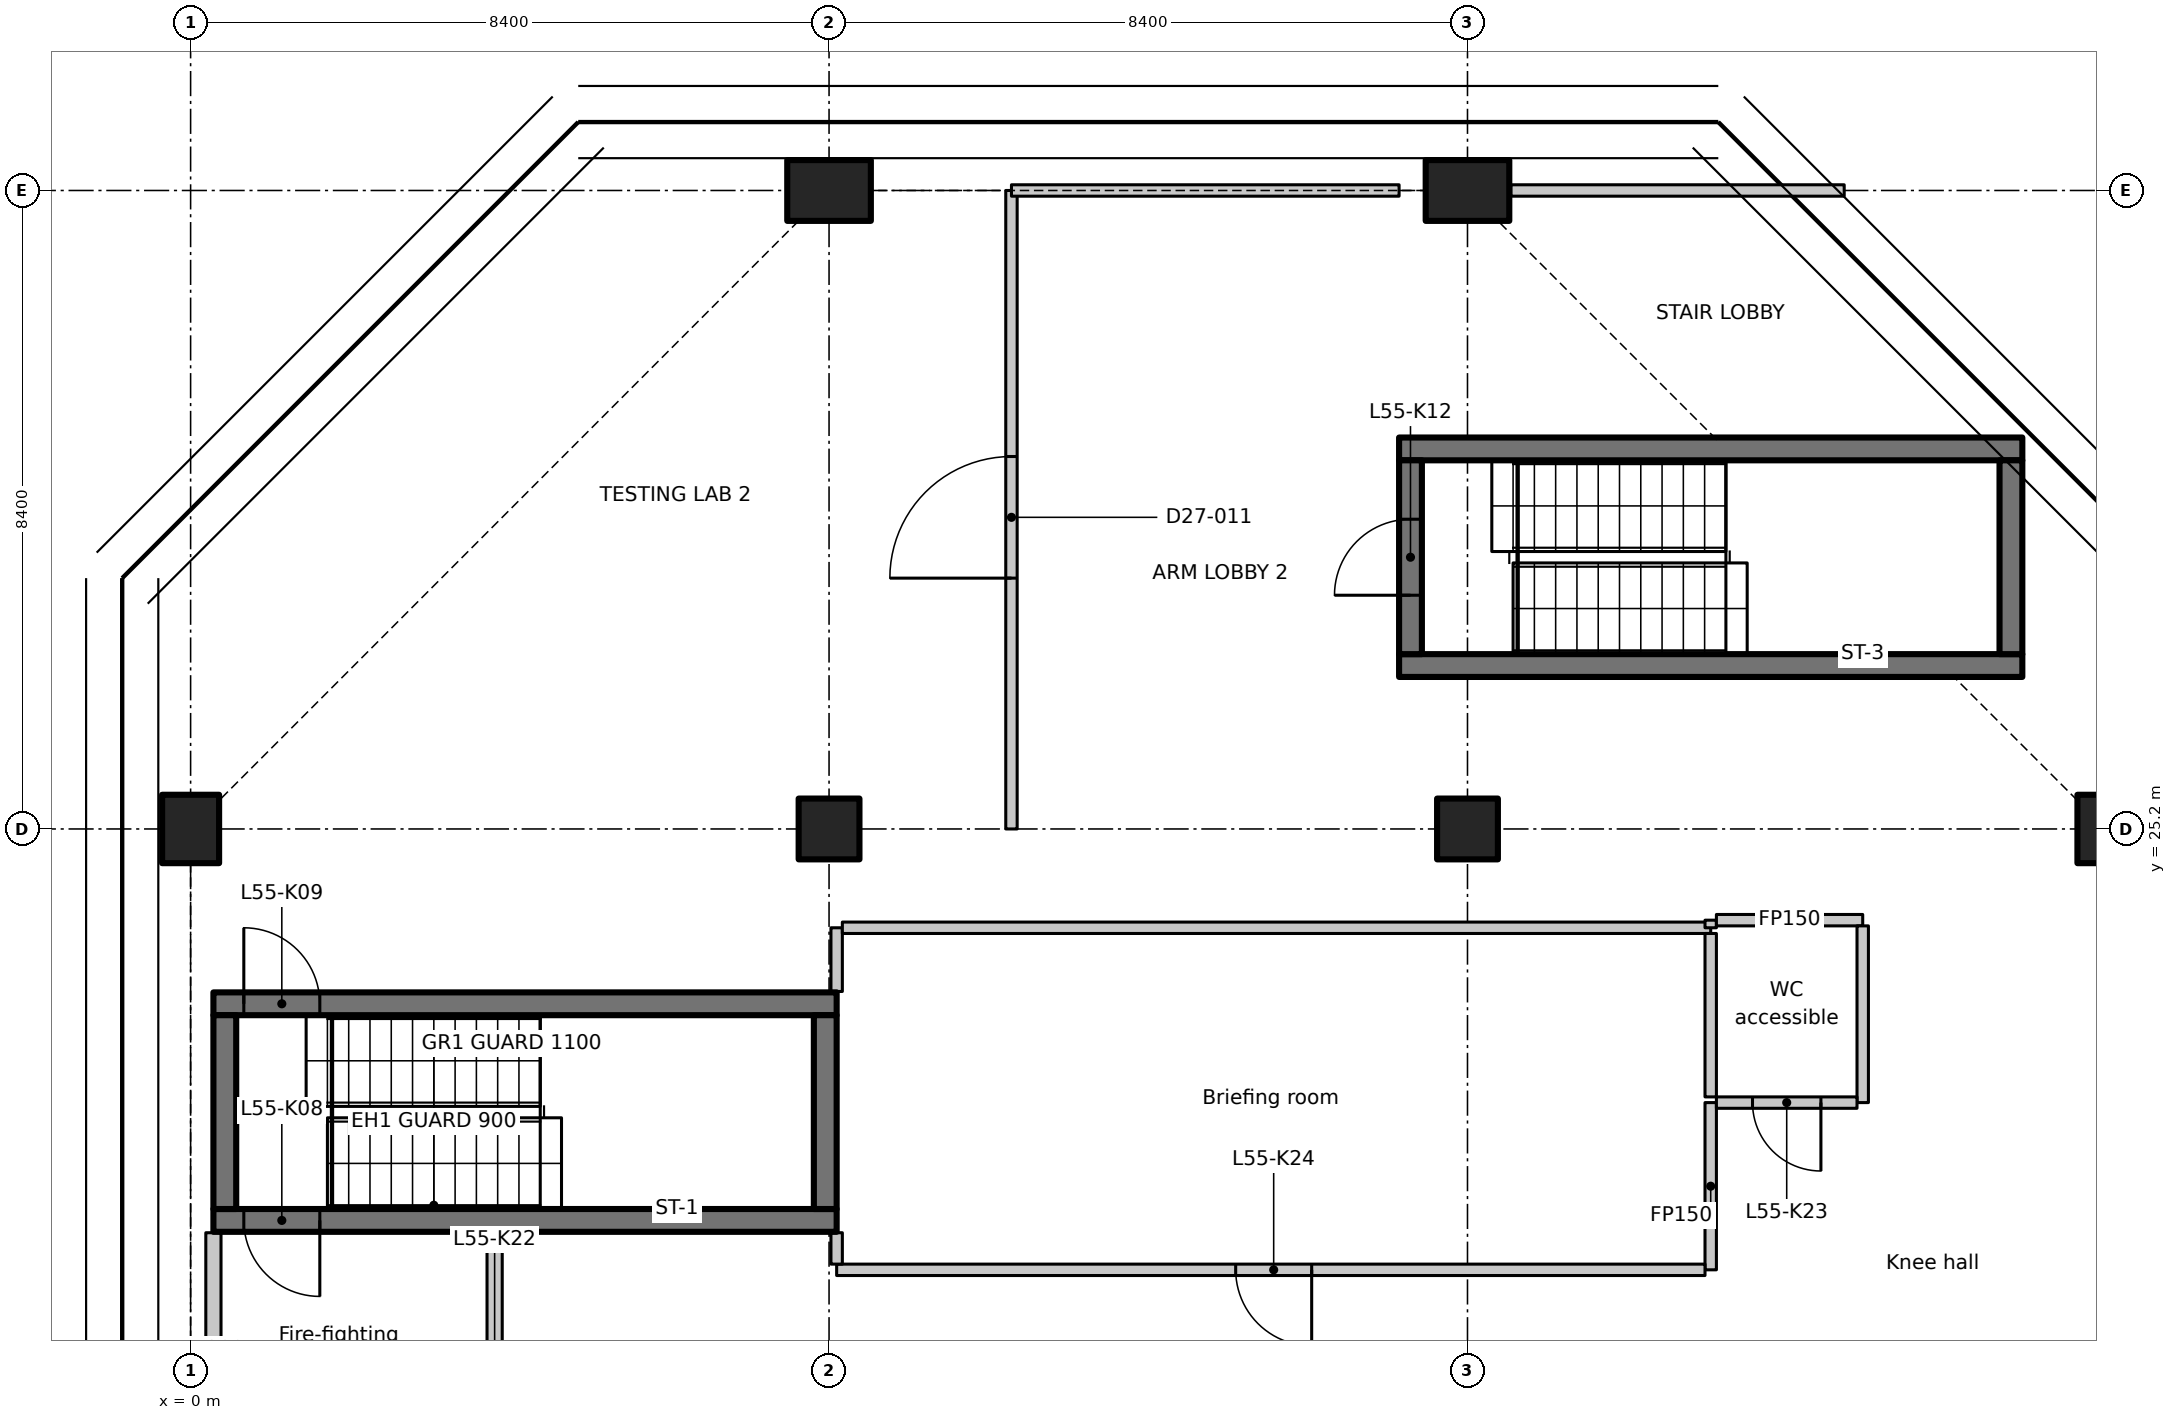
"""IFC4 building model, lengths in metres.
Left out: names, types, materials, properties, quantities, classifications, styles, units other than length and angle.
Written with IfcOpenShell. Run it as: python <this file> out.ifc"""

import sys

from ifc_helpers import new_model, si_unit, direction, frame, frame_2d, origin, origin_2d, place, context, subcontext, project, spatial, polyline, rectangle, outline, extrude, element, fill, save


model = new_model("IFC4")
c1 = context("Model", 3, precision=1e-05, world=origin(), true_north=direction((0.0, 1.0)))
c2 = subcontext(c1, "Body", "Model", "MODEL_VIEW")
j1 = project(units=[si_unit("LENGTHUNIT", "METRE"), si_unit("PLANEANGLEUNIT", "RADIAN")], contexts=[c1])
p1 = place(None, origin())
s1 = spatial("IfcSite", under=j1, at=p1, CompositionType="ELEMENT")
p2 = place(p1, origin())
s2 = spatial("IfcBuilding", under=s1, at=p2, CompositionType="ELEMENT")
p3 = place(p2, frame((0.0, 0.0, 219.3)))
s3 = spatial("IfcBuildingStorey", under=s2, at=p3, CompositionType="ELEMENT", Elevation=219.3)
p4 = place(p3, frame((0.0, 25.2, 0.0), z_axis=(0.0, 0.0, 1.0), x_axis=(1.0, 0.0, 0.0)))
e1 = element("IfcColumn", 1, at=p4, inside=s3, PredefinedType="COLUMN", context=c2, shape_type="SweptSolid", body=[
    extrude(rectangle(XDim=0.75, YDim=0.9, at=origin_2d()), origin(), (0.0, 0.0, 1.0), 3.35),
])
p5 = place(p3, frame((8.4, 25.2, 0.0), z_axis=(0.0, 0.0, 1.0), x_axis=(1.0, 0.0, 0.0)))
e2 = element("IfcColumn", 2, at=p5, inside=s3, PredefinedType="COLUMN", context=c2, shape_type="SweptSolid", body=[
    extrude(rectangle(XDim=0.8, YDim=0.8, at=origin_2d()), origin(), (0.0, 0.0, 1.0), 3.35),
])
p6 = place(p3, frame((8.4, 33.6, 0.0), z_axis=(0.0, 0.0, 1.0), x_axis=(0.0, 1.0, 0.0)))
e3 = element("IfcColumn", 3, at=p6, inside=s3, PredefinedType="COLUMN", context=c2, shape_type="SweptSolid", body=[
    extrude(rectangle(XDim=0.8, YDim=1.1, at=origin_2d()), origin(), (0.0, 0.0, 1.0), 3.35),
])
p7 = place(p3, frame((16.8, 25.2, 0.0), z_axis=(0.0, 0.0, 1.0), x_axis=(1.0, 0.0, 0.0)))
e4 = element("IfcColumn", 4, at=p7, inside=s3, PredefinedType="COLUMN", context=c2, shape_type="SweptSolid", body=[
    extrude(rectangle(XDim=0.8, YDim=0.8, at=origin_2d()), origin(), (0.0, 0.0, 1.0), 3.35),
])
p8 = place(p3, frame((16.8, 33.6, 0.0), z_axis=(0.0, 0.0, 1.0), x_axis=(0.0, 1.0, 0.0)))
e5 = element("IfcColumn", 5, at=p8, inside=s3, PredefinedType="COLUMN", context=c2, shape_type="SweptSolid", body=[
    extrude(rectangle(XDim=0.8, YDim=1.1, at=origin_2d()), origin(), (0.0, 0.0, 1.0), 3.35),
])
p9 = place(p3, frame((25.2, 25.2, 0.0), z_axis=(0.0, 0.0, 1.0), x_axis=(1.0, 0.0, 0.0)))
e6 = element("IfcColumn", 6, at=p9, inside=s3, PredefinedType="COLUMN", context=c2, shape_type="SweptSolid", body=[
    extrude(rectangle(XDim=0.75, YDim=0.9, at=origin_2d()), origin(), (0.0, 0.0, 1.0), 3.35),
])
p10 = place(p3, frame((8.5, 20.05, 0.0), z_axis=(0.0, 0.0, 1.0), x_axis=(-1.0, 0.0, 0.0)))
e7 = element("IfcWall", 7, at=p10, inside=s3, PredefinedType="SHEAR", context=c2, shape_type="SweptSolid", body=[
    extrude(rectangle(XDim=8.2, YDim=0.3, at=frame_2d((4.1, 0.0))), origin(), (0.0, 0.0, 1.0), 3.35),
])
p11 = place(p10, frame((6.8, 0.0, 0.0)))
e8 = element("IfcOpeningElement", 8, at=p11, cuts=e7, PredefinedType="OPENING", context=c2, shape_type="SweptSolid", body=[
    extrude(rectangle(XDim=1.0, YDim=2.1, at=frame_2d((0.5, 1.05))), frame((0.0, 0.16, 0.0), z_axis=(0.0, -1.0, 0.0), x_axis=(1.0, 0.0, 0.0)), (0.0, 0.0, 1.0), 0.32),
])
p12 = place(p3, frame((0.3, 22.9, 0.0), z_axis=(0.0, 0.0, 1.0), x_axis=(1.0, 0.0, 0.0)))
e9 = element("IfcWall", 9, at=p12, inside=s3, PredefinedType="SHEAR", context=c2, shape_type="SweptSolid", body=[
    extrude(rectangle(XDim=8.2, YDim=0.3, at=frame_2d((4.1, 0.0))), origin(), (0.0, 0.0, 1.0), 3.35),
])
p13 = place(p12, frame((0.4, 0.0, 0.0)))
e10 = element("IfcOpeningElement", 10, at=p13, cuts=e9, PredefinedType="OPENING", context=c2, shape_type="SweptSolid", body=[
    extrude(rectangle(XDim=1.0, YDim=2.1, at=frame_2d((0.5, 1.05))), frame((0.0, 0.16, 0.0), z_axis=(0.0, -1.0, 0.0), x_axis=(1.0, 0.0, 0.0)), (0.0, 0.0, 1.0), 0.32),
])
for number, where, z_axis, x_axis in (
    (11, (0.45, 20.2, 0.0), (0.0, 0.0, 1.0), (0.0, 1.0, 0.0)),
    (12, (8.35, 20.2, 0.0), (0.0, 0.0, 1.0), (0.0, 1.0, 0.0)),
):
    element("IfcWall", number, at=place(p3, frame(where, z_axis=z_axis, x_axis=x_axis)), inside=s3, PredefinedType="SHEAR", context=c2, shape_type="SweptSolid", body=[
        extrude(rectangle(XDim=2.55, YDim=0.3, at=frame_2d((1.275, 0.0))), origin(), (0.0, 0.0, 1.0), 3.35),
    ])
for number, where, z_axis, x_axis in (
    (13, (15.9, 27.35, 0.0), (0.0, 0.0, 1.0), (1.0, 0.0, 0.0)),
    (14, (15.9, 30.2, 0.0), (0.0, 0.0, 1.0), (1.0, 0.0, 0.0)),
):
    element("IfcWall", number, at=place(p3, frame(where, z_axis=z_axis, x_axis=x_axis)), inside=s3, PredefinedType="SHEAR", context=c2, shape_type="SweptSolid", body=[
        extrude(rectangle(XDim=8.2, YDim=0.3, at=frame_2d((4.1, 0.0))), origin(), (0.0, 0.0, 1.0), 3.35),
    ])
p14 = place(p3, frame((16.05, 27.5, 0.0), z_axis=(0.0, 0.0, 1.0), x_axis=(0.0, 1.0, 0.0)))
e15 = element("IfcWall", 15, at=p14, inside=s3, PredefinedType="SHEAR", context=c2, shape_type="SweptSolid", body=[
    extrude(rectangle(XDim=2.55, YDim=0.3, at=frame_2d((1.275, 0.0))), origin(), (0.0, 0.0, 1.0), 3.35),
])
p15 = place(p14, frame((0.775, 0.0, 0.0)))
e16 = element("IfcOpeningElement", 16, at=p15, cuts=e15, PredefinedType="OPENING", context=c2, shape_type="SweptSolid", body=[
    extrude(rectangle(XDim=1.0, YDim=2.1, at=frame_2d((0.5, 1.05))), frame((0.0, 0.16, 0.0), z_axis=(0.0, -1.0, 0.0), x_axis=(1.0, 0.0, 0.0)), (0.0, 0.0, 1.0), 0.32),
])
p16 = place(p3, frame((23.95, 27.5, 0.0), z_axis=(0.0, 0.0, 1.0), x_axis=(0.0, 1.0, 0.0)))
e17 = element("IfcWall", 17, at=p16, inside=s3, PredefinedType="SHEAR", context=c2, shape_type="SweptSolid", body=[
    extrude(rectangle(XDim=2.55, YDim=0.3, at=frame_2d((1.275, 0.0))), origin(), (0.0, 0.0, 1.0), 3.35),
])
p17 = place(p3, frame((0.3, 16.812, 0.0), z_axis=(0.0, 0.0, 1.0), x_axis=(0.0, 1.0, 0.0)))
e18 = element("IfcWall", 18, at=p17, inside=s3, PredefinedType="PARTITIONING", context=c2, shape_type="SweptSolid", body=[
    extrude(rectangle(XDim=3.076, YDim=0.2, at=frame_2d((1.538, 0.0))), origin(), (0.0, 0.0, 1.0), 2.98),
])
p18 = place(p3, frame((4.0, 19.888, 0.0), z_axis=(0.0, 0.0, 1.0), x_axis=(0.0, -1.0, 0.0)))
e19 = element("IfcWall", 19, at=p18, inside=s3, PredefinedType="PARTITIONING", context=c2, shape_type="SweptSolid", body=[
    extrude(rectangle(XDim=3.076, YDim=0.2, at=frame_2d((1.538, 0.0))), origin(), (0.0, 0.0, 1.0), 3.35),
])
p19 = place(p18, frame((1.488, 0.0, 0.0)))
e20 = element("IfcOpeningElement", 20, at=p19, cuts=e19, PredefinedType="OPENING", context=c2, shape_type="SweptSolid", body=[
    extrude(rectangle(XDim=1.0, YDim=2.1, at=frame_2d((0.5, 1.05))), frame((0.0, 0.11, 0.0), z_axis=(0.0, -1.0, 0.0), x_axis=(1.0, 0.0, 0.0)), (0.0, 0.0, 1.0), 0.22),
])
p20 = place(p3, frame((20.0, 21.6, 0.0), z_axis=(0.0, 0.0, 1.0), x_axis=(0.0, -1.0, 0.0)))
e21 = element("IfcWall", 21, at=p20, inside=s3, PredefinedType="PARTITIONING", context=c2, shape_type="SweptSolid", body=[
    extrude(rectangle(XDim=2.2, YDim=0.15, at=frame_2d((1.1, 0.0))), origin(), (0.0, 0.0, 1.0), 3.35),
])
p21 = place(p3, frame((19.925, 19.4, 0.0), z_axis=(0.0, 0.0, 1.0), x_axis=(-1.0, 0.0, 0.0)))
e22 = element("IfcWall", 22, at=p21, inside=s3, PredefinedType="PARTITIONING", context=c2, shape_type="SweptSolid", body=[
    extrude(rectangle(XDim=11.425, YDim=0.15, at=frame_2d((5.712, 0.0))), origin(), (0.0, 0.0, 1.0), 3.35),
])
p22 = place(p21, frame((5.175, 0.0, 0.0)))
e23 = element("IfcOpeningElement", 23, at=p22, cuts=e22, PredefinedType="OPENING", context=c2, shape_type="SweptSolid", body=[
    extrude(rectangle(XDim=1.0, YDim=2.1, at=frame_2d((0.5, 1.05))), frame((0.0, 0.085, 0.0), z_axis=(0.0, -1.0, 0.0), x_axis=(1.0, 0.0, 0.0)), (0.0, 0.0, 1.0), 0.17),
])
p23 = place(p3, frame((8.5, 19.475, 0.0), z_axis=(0.0, 0.0, 1.0), x_axis=(0.0, 1.0, 0.0)))
e24 = element("IfcWall", 24, at=p23, inside=s3, PredefinedType="PARTITIONING", context=c2, shape_type="SweptSolid", body=[
    extrude(rectangle(XDim=0.413, YDim=0.15, at=frame_2d((0.207, 0.0))), origin(), (0.0, 0.0, 1.0), 3.35),
])
p24 = place(p3, frame((8.5, 23.062, 0.0), z_axis=(0.0, 0.0, 1.0), x_axis=(0.0, 1.0, 0.0)))
e25 = element("IfcWall", 25, at=p24, inside=s3, PredefinedType="PARTITIONING", context=c2, shape_type="SweptSolid", body=[
    extrude(rectangle(XDim=0.838, YDim=0.15, at=frame_2d((0.419, 0.0))), origin(), (0.0, 0.0, 1.0), 3.35),
])
p25 = place(p3, frame((8.575, 23.9, 0.0), z_axis=(0.0, 0.0, 1.0), x_axis=(1.0, 0.0, 0.0)))
e26 = element("IfcWall", 26, at=p25, inside=s3, PredefinedType="PARTITIONING", context=c2, shape_type="SweptSolid", body=[
    extrude(rectangle(XDim=11.425, YDim=0.15, at=frame_2d((5.712, 0.0))), origin(), (0.0, 0.0, 1.0), 3.35),
])
p26 = place(p3, frame((20.0, 23.9, 0.0), z_axis=(0.0, 0.0, 1.0), x_axis=(0.0, 1.0, 0.0)))
e27 = element("IfcWall", 27, at=p26, inside=s3, PredefinedType="PARTITIONING", context=c2, shape_type="SweptSolid", body=[
    extrude(rectangle(XDim=0.1, YDim=0.15, at=frame_2d((0.05, 0.0))), origin(), (0.0, 0.0, 1.0), 3.35),
])
p27 = place(p3, frame((20.075, 24.0, 0.0), z_axis=(0.0, 0.0, 1.0), x_axis=(1.0, 0.0, 0.0)))
e28 = element("IfcWall", 28, at=p27, inside=s3, PredefinedType="PARTITIONING", context=c2, shape_type="SweptSolid", body=[
    extrude(rectangle(XDim=1.925, YDim=0.15, at=frame_2d((0.962, 0.0))), origin(), (0.0, 0.0, 1.0), 3.35),
])
p28 = place(p3, frame((22.0, 23.925, 0.0), z_axis=(0.0, 0.0, 1.0), x_axis=(0.0, -1.0, 0.0)))
e29 = element("IfcWall", 29, at=p28, inside=s3, PredefinedType="PARTITIONING", context=c2, shape_type="SweptSolid", body=[
    extrude(rectangle(XDim=2.325, YDim=0.15, at=frame_2d((1.163, 0.0))), origin(), (0.0, 0.0, 1.0), 3.35),
])
p29 = place(p3, frame((21.925, 21.6, 0.0), z_axis=(0.0, 0.0, 1.0), x_axis=(-1.0, 0.0, 0.0)))
e30 = element("IfcWall", 30, at=p29, inside=s3, PredefinedType="PARTITIONING", context=c2, shape_type="SweptSolid", body=[
    extrude(rectangle(XDim=1.85, YDim=0.15, at=frame_2d((0.925, 0.0))), origin(), (0.0, 0.0, 1.0), 3.35),
])
p30 = place(p29, frame((0.475, 0.0, 0.0)))
e31 = element("IfcOpeningElement", 31, at=p30, cuts=e30, PredefinedType="OPENING", context=c2, shape_type="SweptSolid", body=[
    extrude(rectangle(XDim=0.9, YDim=2.1, at=frame_2d((0.45, 1.05))), frame((0.0, 0.085, 0.0), z_axis=(0.0, -1.0, 0.0), x_axis=(1.0, 0.0, 0.0)), (0.0, 0.0, 1.0), 0.17),
])
p31 = place(p3, frame((20.0, 21.675, 0.0), z_axis=(0.0, 0.0, 1.0), x_axis=(0.0, 1.0, 0.0)))
e32 = element("IfcWall", 32, at=p31, inside=s3, PredefinedType="PARTITIONING", context=c2, shape_type="SweptSolid", body=[
    extrude(rectangle(XDim=2.15, YDim=0.15, at=frame_2d((1.075, 0.0))), origin(), (0.0, 0.0, 1.0), 3.35),
])
p32 = place(p3, frame((10.8, 25.2, 0.0), z_axis=(0.0, 0.0, 1.0), x_axis=(0.0, 1.0, 0.0)))
e33 = element("IfcWall", 33, at=p32, inside=s3, PredefinedType="PARTITIONING", context=c2, shape_type="SweptSolid", body=[
    extrude(outline(polyline([(0.0, 0.0), (8.4, 0.0), (8.4, 2.98), (7.952, 2.98), (7.95, 3.33), (0.0, 3.33), (0.0, 0.0)])), frame((0.0, 0.075, 0.0), z_axis=(0.0, -1.0, 0.0), x_axis=(1.0, 0.0, 0.0)), (0.0, 0.0, 1.0), 0.15),
])
p33 = place(p32, frame((3.3, 0.0, 0.0)))
e34 = element("IfcOpeningElement", 34, at=p33, cuts=e33, PredefinedType="OPENING", context=c2, shape_type="SweptSolid", body=[
    extrude(rectangle(XDim=1.6, YDim=2.1, at=frame_2d((0.8, 1.05))), frame((0.0, 0.085, 0.0), z_axis=(0.0, -1.0, 0.0), x_axis=(1.0, 0.0, 0.0)), (0.0, 0.0, 1.0), 0.17),
])
p34 = place(p3, frame((10.8, 33.6, 0.0), z_axis=(0.0, 0.0, 1.0), x_axis=(1.0, 0.0, 0.0)))
e35 = element("IfcWall", 35, at=p34, inside=s3, PredefinedType="PARTITIONING", context=c2, shape_type="SweptSolid", body=[
    extrude(outline(polyline([(0.0, 0.0), (5.1, 0.0), (5.1, 2.98), (0.0, 2.98), (0.0, 0.0)])), frame((0.0, 0.075, 0.0), z_axis=(0.0, -1.0, 0.0), x_axis=(1.0, 0.0, 0.0)), (0.0, 0.0, 1.0), 0.15),
])
p35 = place(p3, frame((17.37, 33.6, 0.0), z_axis=(0.0, 0.0, 1.0), x_axis=(1.0, 0.0, 0.0)))
e36 = element("IfcWall", 36, at=p35, inside=s3, PredefinedType="PARTITIONING", context=c2, shape_type="SweptSolid", body=[
    extrude(rectangle(XDim=4.386, YDim=0.15, at=frame_2d((2.193, 0.0))), origin(), (0.0, 0.0, 1.0), 2.98),
])
p36 = place(p11, origin())
e37 = element("IfcDoor", 37, at=p36, inside=s3, OperationType="SINGLE_SWING_RIGHT", PredefinedType="DOOR", context=c2, shape_type="SweptSolid", body=[
    extrude(rectangle(XDim=1.0, YDim=2.1, at=frame_2d((0.5, 1.05))), frame((0.0, 0.025, 0.0), z_axis=(0.0, -1.0, 0.0), x_axis=(1.0, 0.0, 0.0)), (0.0, 0.0, 1.0), 0.05),
])
fill(e8, e37)
p37 = place(p13, origin())
e38 = element("IfcDoor", 38, at=p37, inside=s3, OperationType="SINGLE_SWING_LEFT", PredefinedType="DOOR", context=c2, shape_type="SweptSolid", body=[
    extrude(rectangle(XDim=1.0, YDim=2.1, at=frame_2d((0.5, 1.05))), frame((0.0, 0.025, 0.0), z_axis=(0.0, -1.0, 0.0), x_axis=(1.0, 0.0, 0.0)), (0.0, 0.0, 1.0), 0.05),
])
fill(e10, e38)
p38 = place(p15, origin())
e39 = element("IfcDoor", 39, at=p38, inside=s3, OperationType="SINGLE_SWING_RIGHT", PredefinedType="DOOR", context=c2, shape_type="SweptSolid", body=[
    extrude(rectangle(XDim=1.0, YDim=2.1, at=frame_2d((0.5, 1.05))), frame((0.0, 0.025, 0.0), z_axis=(0.0, -1.0, 0.0), x_axis=(1.0, 0.0, 0.0)), (0.0, 0.0, 1.0), 0.05),
])
fill(e16, e39)
p39 = place(p30, origin())
e40 = element("IfcDoor", 40, at=p39, inside=s3, OperationType="SINGLE_SWING_LEFT", PredefinedType="DOOR", context=c2, shape_type="SweptSolid", body=[
    extrude(rectangle(XDim=0.9, YDim=2.1, at=frame_2d((0.45, 1.05))), frame((0.0, 0.025, 0.0), z_axis=(0.0, -1.0, 0.0), x_axis=(1.0, 0.0, 0.0)), (0.0, 0.0, 1.0), 0.05),
])
fill(e31, e40)
p40 = place(p22, origin())
e41 = element("IfcDoor", 41, at=p40, inside=s3, OperationType="SINGLE_SWING_RIGHT", PredefinedType="DOOR", context=c2, shape_type="SweptSolid", body=[
    extrude(rectangle(XDim=1.0, YDim=2.1, at=frame_2d((0.5, 1.05))), frame((0.0, 0.025, 0.0), z_axis=(0.0, -1.0, 0.0), x_axis=(1.0, 0.0, 0.0)), (0.0, 0.0, 1.0), 0.05),
])
fill(e23, e41)
p41 = place(p33, origin())
e42 = element("IfcDoor", 42, at=p41, inside=s3, OperationType="DOUBLE_DOOR_SINGLE_SWING", PredefinedType="DOOR", context=c2, shape_type="SweptSolid", body=[
    extrude(rectangle(XDim=1.6, YDim=2.1, at=frame_2d((0.8, 1.05))), frame((0.0, 0.025, 0.0), z_axis=(0.0, -1.0, 0.0), x_axis=(1.0, 0.0, 0.0)), (0.0, 0.0, 1.0), 0.05),
])
fill(e34, e42)
save(model, sys.argv[1])
